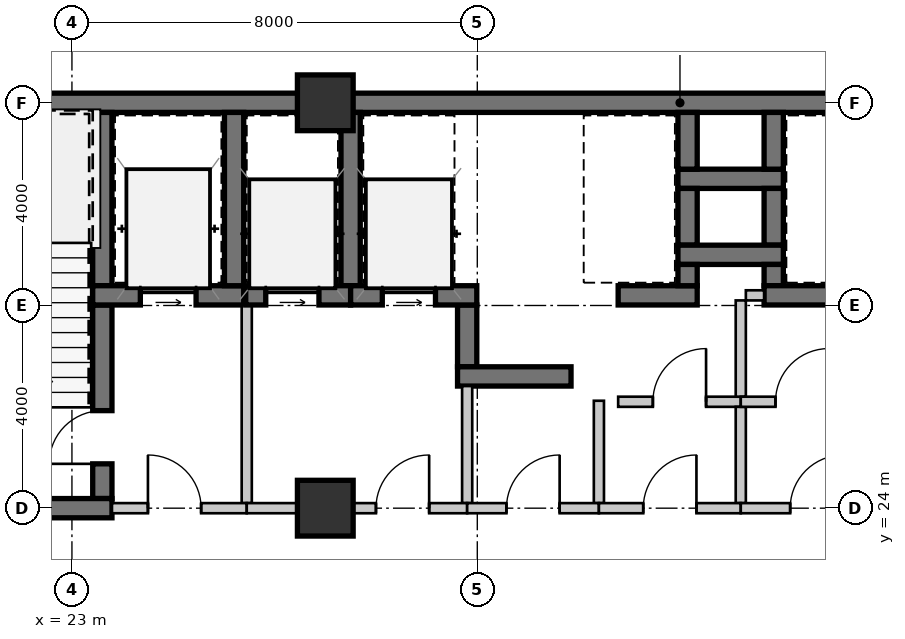
"""IFC4 building model, lengths in metres.
Left out: names, types, materials, properties, quantities, classifications, styles, units other than length and angle.
Written with IfcOpenShell. Run it as: python <this file> out.ifc"""

import sys

from ifc_helpers import new_model, si_unit, direction, frame, frame_2d, origin, origin_2d, place, context, subcontext, project, spatial, rectangle, extrude, source, transform, mapped, element, fill, save


model = new_model("IFC4")
c1 = context("Model", 3, precision=1e-05, world=origin(), true_north=direction((0.0, 1.0)))
c2 = subcontext(c1, "Body", "Model", "MODEL_VIEW")
j1 = project(units=[si_unit("LENGTHUNIT", "METRE"), si_unit("PLANEANGLEUNIT", "RADIAN")], contexts=[c1])
p1 = place(None, origin())
s1 = spatial("IfcSite", under=j1, at=p1, CompositionType="ELEMENT")
p2 = place(p1, origin())
s2 = spatial("IfcBuilding", under=s1, at=p2, CompositionType="ELEMENT")
p3 = place(p2, frame((0.0, 0.0, 12.95)))
s3 = spatial("IfcBuildingStorey", under=s2, at=p3, CompositionType="ELEMENT", Elevation=12.95)
m1 = source(origin(), c2, "Body", "SweptSolid", [
    extrude(rectangle(XDim=1.1, YDim=1.1, at=origin_2d()), origin(), (0.0, 0.0, 1.0), 3.85),
])
for number, where, z_axis, x_axis in (
    (1, (28.0, 24.0, 0.0), (0.0, 0.0, 1.0), (1.0, 0.0, 0.0)),
    (2, (28.0, 32.0, 0.0), (0.0, 0.0, 1.0), (1.0, 0.0, 0.0)),
):
    element("IfcColumn", number, at=place(p3, frame(where, z_axis=z_axis, x_axis=x_axis)), inside=s3, PredefinedType="COLUMN", context=c2, shape_type="MappedRepresentation", body=[
        mapped(m1, transform((0.0, 0.0, 0.0), scale=1.0)),
    ])
m2 = source(origin(), c2, "Body", "SweptSolid", [
    extrude(rectangle(XDim=9.19, YDim=0.38, at=frame_2d((4.595, 0.0))), origin(), (0.0, 0.0, 1.0), 3.43),
])
p4 = place(p3, frame((18.81, 32.0, 0.0), z_axis=(0.0, 0.0, 1.0), x_axis=(1.0, 0.0, 0.0)))
e3 = element("IfcWall", 3, at=p4, inside=s3, PredefinedType="SHEAR", context=c2, shape_type="MappedRepresentation", body=[
    mapped(m2, transform((0.0, 0.0, 0.0), scale=1.0)),
])
m3 = source(origin(), c2, "Body", "SweptSolid", [
    extrude(rectangle(XDim=11.2, YDim=0.38, at=frame_2d((5.6, 0.0))), origin(), (0.0, 0.0, 1.0), 3.43),
])
p5 = place(p3, frame((28.0, 32.0, 0.0), z_axis=(0.0, 0.0, 1.0), x_axis=(1.0, 0.0, 0.0)))
e4 = element("IfcWall", 4, at=p5, inside=s3, PredefinedType="SHEAR", context=c2, shape_type="MappedRepresentation", body=[
    mapped(m3, transform((0.0, 0.0, 0.0), scale=1.0)),
])
m4 = source(origin(), c2, "Body", "SweptSolid", [
    extrude(rectangle(XDim=3.42, YDim=0.38, at=frame_2d((1.71, 0.0))), origin(), (0.0, 0.0, 1.0), 3.43),
])
p6 = place(p3, frame((23.6, 28.39, 0.0), z_axis=(0.0, 0.0, 1.0), x_axis=(0.0, 1.0, 0.0)))
e5 = element("IfcWall", 5, at=p6, inside=s3, PredefinedType="SHEAR", context=c2, shape_type="MappedRepresentation", body=[
    mapped(m4, transform((0.0, 0.0, 0.0), scale=1.0)),
])
m5 = source(origin(), c2, "Body", "SweptSolid", [
    extrude(rectangle(XDim=3.82, YDim=0.38, at=frame_2d((1.91, 0.0))), origin(), (0.0, 0.0, 1.0), 3.43),
])
p7 = place(p3, frame((23.6, 24.19, 0.0), z_axis=(0.0, 0.0, 1.0), x_axis=(0.0, 1.0, 0.0)))
e6 = element("IfcWall", 6, at=p7, inside=s3, PredefinedType="SHEAR", context=c2, shape_type="MappedRepresentation", body=[
    mapped(m5, transform((0.0, 0.0, 0.0), scale=1.0)),
])
m6 = source(origin(), c2, "Body", "SweptSolid", [
    extrude(rectangle(XDim=1.05, YDim=2.1, at=frame_2d((0.525, 1.05))), frame((0.0, 0.2, 0.0), z_axis=(0.0, -1.0, 0.0), x_axis=(1.0, 0.0, 0.0)), (0.0, 0.0, 1.0), 0.4),
])
p8 = place(p7, frame((0.685, 0.0, 0.0)))
e7 = element("IfcOpeningElement", 7, at=p8, cuts=e6, PredefinedType="OPENING", context=c2, shape_type="MappedRepresentation", body=[
    mapped(m6, transform((0.0, 0.0, 0.0), scale=1.0)),
])
m7 = source(origin(), c2, "Body", "SweptSolid", [
    extrude(rectangle(XDim=4.98, YDim=0.38, at=frame_2d((2.49, 0.0))), origin(), (0.0, 0.0, 1.0), 3.43),
])
p9 = place(p3, frame((18.81, 24.0, 0.0), z_axis=(0.0, 0.0, 1.0), x_axis=(1.0, 0.0, 0.0)))
e8 = element("IfcWall", 8, at=p9, inside=s3, PredefinedType="SHEAR", context=c2, shape_type="MappedRepresentation", body=[
    mapped(m7, transform((0.0, 0.0, 0.0), scale=1.0)),
])
m8 = source(origin(), c2, "Body", "SweptSolid", [
    extrude(rectangle(XDim=2.98, YDim=0.38, at=frame_2d((1.49, 0.0))), origin(), (0.0, 0.0, 1.0), 3.43),
])
p10 = place(p3, frame((23.41, 28.2, 0.0), z_axis=(0.0, 0.0, 1.0), x_axis=(1.0, 0.0, 0.0)))
e9 = element("IfcWall", 9, at=p10, inside=s3, PredefinedType="SHEAR", context=c2, shape_type="MappedRepresentation", body=[
    mapped(m8, transform((0.0, 0.0, 0.0), scale=1.0)),
])
m9 = source(origin(), c2, "Body", "SweptSolid", [
    extrude(rectangle(XDim=1.1, YDim=2.15, at=frame_2d((0.55, 1.075))), frame((0.0, 0.2, 0.0), z_axis=(0.0, -1.0, 0.0), x_axis=(1.0, 0.0, 0.0)), (0.0, 0.0, 1.0), 0.4),
])
p11 = place(p10, frame((0.94, 0.0, 0.0)))
e10 = element("IfcOpeningElement", 10, at=p11, cuts=e9, PredefinedType="OPENING", context=c2, shape_type="MappedRepresentation", body=[
    mapped(m9, transform((0.0, 0.0, 0.0), scale=1.0)),
])
p12 = place(p3, frame((26.2, 28.39, 0.0), z_axis=(0.0, 0.0, 1.0), x_axis=(0.0, 1.0, 0.0)))
e11 = element("IfcWall", 11, at=p12, inside=s3, PredefinedType="SHEAR", context=c2, shape_type="MappedRepresentation", body=[
    mapped(m4, transform((0.0, 0.0, 0.0), scale=1.0)),
])
m10 = source(origin(), c2, "Body", "SweptSolid", [
    extrude(rectangle(XDim=3.91, YDim=0.2, at=frame_2d((1.955, 0.0))), origin(), (0.0, 0.0, 1.0), 3.43),
])
p13 = place(p3, frame((26.45, 24.1, 0.0), z_axis=(0.0, 0.0, 1.0), x_axis=(0.0, 1.0, 0.0)))
e12 = element("IfcWall", 12, at=p13, inside=s3, PredefinedType="SOLIDWALL", context=c2, shape_type="MappedRepresentation", body=[
    mapped(m10, transform((0.0, 0.0, 0.0), scale=1.0)),
])
m11 = source(origin(), c2, "Body", "SweptSolid", [
    extrude(rectangle(XDim=2.66, YDim=0.2, at=frame_2d((1.33, 0.0))), origin(), (0.0, 0.0, 1.0), 2.97),
])
p14 = place(p3, frame((23.79, 24.0, 0.0), z_axis=(0.0, 0.0, 1.0), x_axis=(1.0, 0.0, 0.0)))
e13 = element("IfcWall", 13, at=p14, inside=s3, PredefinedType="SOLIDWALL", context=c2, shape_type="MappedRepresentation", body=[
    mapped(m11, transform((0.0, 0.0, 0.0), scale=1.0)),
])
m12 = source(origin(), c2, "Body", "SweptSolid", [
    extrude(rectangle(XDim=1.05, YDim=2.1, at=frame_2d((0.525, 1.05))), frame((0.0, 0.11, 0.0), z_axis=(0.0, -1.0, 0.0), x_axis=(1.0, 0.0, 0.0)), (0.0, 0.0, 1.0), 0.22),
])
p15 = place(p14, frame((0.71, 0.0, 0.0)))
e14 = element("IfcOpeningElement", 14, at=p15, cuts=e13, PredefinedType="OPENING", context=c2, shape_type="MappedRepresentation", body=[
    mapped(m12, transform((0.0, 0.0, 0.0), scale=1.0)),
])
m13 = source(origin(), c2, "Body", "SweptSolid", [
    extrude(rectangle(XDim=2.08, YDim=0.38, at=frame_2d((1.04, 0.0))), origin(), (0.0, 0.0, 1.0), 3.43),
])
p16 = place(p3, frame((34.96, 30.5, 0.0), z_axis=(0.0, 0.0, 1.0), x_axis=(1.0, 0.0, 0.0)))
e15 = element("IfcWall", 15, at=p16, inside=s3, PredefinedType="SHEAR", context=c2, shape_type="MappedRepresentation", body=[
    mapped(m13, transform((0.0, 0.0, 0.0), scale=1.0)),
])
m14 = source(origin(), c2, "Body", "SweptSolid", [
    extrude(rectangle(XDim=1.12, YDim=0.38, at=frame_2d((0.56, 0.0))), origin(), (0.0, 0.0, 1.0), 3.43),
])
for number, where, z_axis, x_axis in (
    (16, (35.15, 31.81, 0.0), (0.0, 0.0, 1.0), (0.0, -1.0, 0.0)),
    (17, (36.85, 30.69, 0.0), (0.0, 0.0, 1.0), (0.0, 1.0, 0.0)),
    (18, (35.15, 30.31, 0.0), (0.0, 0.0, 1.0), (0.0, -1.0, 0.0)),
    (19, (36.85, 29.19, 0.0), (0.0, 0.0, 1.0), (0.0, 1.0, 0.0)),
):
    element("IfcWall", number, at=place(p3, frame(where, z_axis=z_axis, x_axis=x_axis)), inside=s3, PredefinedType="SHEAR", context=c2, shape_type="MappedRepresentation", body=[
        mapped(m14, transform((0.0, 0.0, 0.0), scale=1.0)),
    ])
p17 = place(p3, frame((34.96, 29.0, 0.0), z_axis=(0.0, 0.0, 1.0), x_axis=(1.0, 0.0, 0.0)))
e20 = element("IfcWall", 20, at=p17, inside=s3, PredefinedType="SHEAR", context=c2, shape_type="MappedRepresentation", body=[
    mapped(m13, transform((0.0, 0.0, 0.0), scale=1.0)),
])
m15 = source(origin(), c2, "Body", "SweptSolid", [
    extrude(rectangle(XDim=1.22, YDim=0.38, at=frame_2d((0.61, 0.0))), origin(), (0.0, 0.0, 1.0), 3.43),
])
p18 = place(p3, frame((30.8, 28.01, 0.0), z_axis=(0.0, 0.0, 1.0), x_axis=(0.0, -1.0, 0.0)))
e21 = element("IfcWall", 21, at=p18, inside=s3, PredefinedType="SHEAR", context=c2, shape_type="MappedRepresentation", body=[
    mapped(m15, transform((0.0, 0.0, 0.0), scale=1.0)),
])
m16 = source(origin(), c2, "Body", "SweptSolid", [
    extrude(rectangle(XDim=2.24, YDim=0.38, at=frame_2d((1.12, 0.0))), origin(), (0.0, 0.0, 1.0), 3.43),
])
p19 = place(p3, frame((30.61, 26.6, 0.0), z_axis=(0.0, 0.0, 1.0), x_axis=(1.0, 0.0, 0.0)))
e22 = element("IfcWall", 22, at=p19, inside=s3, PredefinedType="SHEAR", context=c2, shape_type="MappedRepresentation", body=[
    mapped(m16, transform((0.0, 0.0, 0.0), scale=1.0)),
])
p20 = place(p3, frame((28.5, 28.39, 0.0), z_axis=(0.0, 0.0, 1.0), x_axis=(0.0, 1.0, 0.0)))
e23 = element("IfcWall", 23, at=p20, inside=s3, PredefinedType="SHEAR", context=c2, shape_type="MappedRepresentation", body=[
    mapped(m4, transform((0.0, 0.0, 0.0), scale=1.0)),
])
m17 = source(origin(), c2, "Body", "SweptSolid", [
    extrude(rectangle(XDim=2.07, YDim=0.38, at=frame_2d((1.035, 0.0))), origin(), (0.0, 0.0, 1.0), 3.43),
])
p21 = place(p3, frame((26.43, 28.2, 0.0), z_axis=(0.0, 0.0, 1.0), x_axis=(1.0, 0.0, 0.0)))
e24 = element("IfcWall", 24, at=p21, inside=s3, PredefinedType="SHEAR", context=c2, shape_type="MappedRepresentation", body=[
    mapped(m17, transform((0.0, 0.0, 0.0), scale=1.0)),
])
m18 = source(origin(), c2, "Body", "SweptSolid", [
    extrude(rectangle(XDim=1.05, YDim=2.15, at=frame_2d((0.525, 1.075))), frame((0.0, 0.2, 0.0), z_axis=(0.0, -1.0, 0.0), x_axis=(1.0, 0.0, 0.0)), (0.0, 0.0, 1.0), 0.4),
])
p22 = place(p21, frame((0.395, 0.0, 0.0)))
e25 = element("IfcOpeningElement", 25, at=p22, cuts=e24, PredefinedType="OPENING", context=c2, shape_type="MappedRepresentation", body=[
    mapped(m18, transform((0.0, 0.0, 0.0), scale=1.0)),
])
m19 = source(origin(), c2, "Body", "SweptSolid", [
    extrude(rectangle(XDim=2.49, YDim=0.38, at=frame_2d((1.245, 0.0))), origin(), (0.0, 0.0, 1.0), 3.43),
])
p23 = place(p3, frame((28.5, 28.2, 0.0), z_axis=(0.0, 0.0, 1.0), x_axis=(1.0, 0.0, 0.0)))
e26 = element("IfcWall", 26, at=p23, inside=s3, PredefinedType="SHEAR", context=c2, shape_type="MappedRepresentation", body=[
    mapped(m19, transform((0.0, 0.0, 0.0), scale=1.0)),
])
p24 = place(p23, frame((0.625, 0.0, 0.0)))
e27 = element("IfcOpeningElement", 27, at=p24, cuts=e26, PredefinedType="OPENING", context=c2, shape_type="MappedRepresentation", body=[
    mapped(m18, transform((0.0, 0.0, 0.0), scale=1.0)),
])
m20 = source(origin(), c2, "Body", "SweptSolid", [
    extrude(rectangle(XDim=2.31, YDim=0.2, at=frame_2d((1.155, 0.0))), origin(), (0.0, 0.0, 1.0), 3.43),
])
p25 = place(p3, frame((30.8, 26.41, 0.0), z_axis=(0.0, 0.0, 1.0), x_axis=(0.0, -1.0, 0.0)))
e28 = element("IfcWall", 28, at=p25, inside=s3, PredefinedType="SOLIDWALL", context=c2, shape_type="MappedRepresentation", body=[
    mapped(m20, transform((0.0, 0.0, 0.0), scale=1.0)),
])
m21 = source(origin(), c2, "Body", "SweptSolid", [
    extrude(rectangle(XDim=4.35, YDim=0.2, at=frame_2d((2.175, 0.0))), origin(), (0.0, 0.0, 1.0), 2.97),
])
p26 = place(p3, frame((30.8, 24.0, 0.0), z_axis=(0.0, 0.0, 1.0), x_axis=(-1.0, 0.0, 0.0)))
e29 = element("IfcWall", 29, at=p26, inside=s3, PredefinedType="SOLIDWALL", context=c2, shape_type="MappedRepresentation", body=[
    mapped(m21, transform((0.0, 0.0, 0.0), scale=1.0)),
])
p27 = place(p26, frame((0.75, 0.0, 0.0)))
e30 = element("IfcOpeningElement", 30, at=p27, cuts=e29, PredefinedType="OPENING", context=c2, shape_type="MappedRepresentation", body=[
    mapped(m12, transform((0.0, 0.0, 0.0), scale=1.0)),
])
m22 = source(origin(), c2, "Body", "SweptSolid", [
    extrude(rectangle(XDim=1.56, YDim=0.38, at=frame_2d((0.78, 0.0))), origin(), (0.0, 0.0, 1.0), 3.43),
])
p28 = place(p3, frame((33.78, 28.2, 0.0), z_axis=(0.0, 0.0, 1.0), x_axis=(1.0, 0.0, 0.0)))
e31 = element("IfcWall", 31, at=p28, inside=s3, PredefinedType="SHEAR", context=c2, shape_type="MappedRepresentation", body=[
    mapped(m22, transform((0.0, 0.0, 0.0), scale=1.0)),
])
m23 = source(origin(), c2, "Body", "SweptSolid", [
    extrude(rectangle(XDim=0.42, YDim=0.38, at=frame_2d((0.21, 0.0))), origin(), (0.0, 0.0, 1.0), 3.43),
])
for number, where, z_axis, x_axis in (
    (32, (35.15, 28.39, 0.0), (0.0, 0.0, 1.0), (0.0, 1.0, 0.0)),
    (33, (36.85, 28.81, 0.0), (0.0, 0.0, 1.0), (0.0, -1.0, 0.0)),
):
    element("IfcWall", number, at=place(p3, frame(where, z_axis=z_axis, x_axis=x_axis)), inside=s3, PredefinedType="SHEAR", context=c2, shape_type="MappedRepresentation", body=[
        mapped(m23, transform((0.0, 0.0, 0.0), scale=1.0)),
    ])
m24 = source(origin(), c2, "Body", "SweptSolid", [
    extrude(rectangle(XDim=1.96, YDim=0.38, at=frame_2d((0.98, 0.0))), origin(), (0.0, 0.0, 1.0), 3.43),
])
p29 = place(p3, frame((36.66, 28.2, 0.0), z_axis=(0.0, 0.0, 1.0), x_axis=(1.0, 0.0, 0.0)))
e34 = element("IfcWall", 34, at=p29, inside=s3, PredefinedType="SHEAR", context=c2, shape_type="MappedRepresentation", body=[
    mapped(m24, transform((0.0, 0.0, 0.0), scale=1.0)),
])
m25 = source(origin(), c2, "Body", "SweptSolid", [
    extrude(rectangle(XDim=2.02, YDim=0.2, at=frame_2d((1.01, 0.0))), origin(), (0.0, 0.0, 1.0), 3.43),
])
p30 = place(p3, frame((33.4, 26.12, 0.0), z_axis=(0.0, 0.0, 1.0), x_axis=(0.0, -1.0, 0.0)))
e35 = element("IfcWall", 35, at=p30, inside=s3, PredefinedType="SOLIDWALL", context=c2, shape_type="MappedRepresentation", body=[
    mapped(m25, transform((0.0, 0.0, 0.0), scale=1.0)),
])
m26 = source(origin(), c2, "Body", "SweptSolid", [
    extrude(rectangle(XDim=2.6, YDim=0.2, at=frame_2d((1.3, 0.0))), origin(), (0.0, 0.0, 1.0), 2.97),
])
p31 = place(p3, frame((33.4, 24.0, 0.0), z_axis=(0.0, 0.0, 1.0), x_axis=(-1.0, 0.0, 0.0)))
e36 = element("IfcWall", 36, at=p31, inside=s3, PredefinedType="SOLIDWALL", context=c2, shape_type="MappedRepresentation", body=[
    mapped(m26, transform((0.0, 0.0, 0.0), scale=1.0)),
])
p32 = place(p31, frame((0.775, 0.0, 0.0)))
e37 = element("IfcOpeningElement", 37, at=p32, cuts=e36, PredefinedType="OPENING", context=c2, shape_type="MappedRepresentation", body=[
    mapped(m12, transform((0.0, 0.0, 0.0), scale=1.0)),
])
m27 = source(origin(), c2, "Body", "SweptSolid", [
    extrude(rectangle(XDim=2.42, YDim=0.2, at=frame_2d((1.21, 0.0))), origin(), (0.0, 0.0, 1.0), 3.43),
])
p33 = place(p3, frame((33.78, 26.1, 0.0), z_axis=(0.0, 0.0, 1.0), x_axis=(1.0, 0.0, 0.0)))
e38 = element("IfcWall", 38, at=p33, inside=s3, PredefinedType="SOLIDWALL", context=c2, shape_type="MappedRepresentation", body=[
    mapped(m27, transform((0.0, 0.0, 0.0), scale=1.0)),
])
p34 = place(p33, frame((0.685, 0.0, 0.0)))
e39 = element("IfcOpeningElement", 39, at=p34, cuts=e38, PredefinedType="OPENING", context=c2, shape_type="MappedRepresentation", body=[
    mapped(m12, transform((0.0, 0.0, 0.0), scale=1.0)),
])
m28 = source(origin(), c2, "Body", "SweptSolid", [
    extrude(rectangle(XDim=1.9, YDim=0.2, at=frame_2d((0.95, 0.0))), origin(), (0.0, 0.0, 1.0), 3.43),
])
p35 = place(p3, frame((36.2, 26.0, 0.0), z_axis=(0.0, 0.0, 1.0), x_axis=(0.0, -1.0, 0.0)))
e40 = element("IfcWall", 40, at=p35, inside=s3, PredefinedType="SOLIDWALL", context=c2, shape_type="MappedRepresentation", body=[
    mapped(m28, transform((0.0, 0.0, 0.0), scale=1.0)),
])
m29 = source(origin(), c2, "Body", "SweptSolid", [
    extrude(rectangle(XDim=2.8, YDim=0.2, at=frame_2d((1.4, 0.0))), origin(), (0.0, 0.0, 1.0), 2.97),
])
p36 = place(p3, frame((36.2, 24.0, 0.0), z_axis=(0.0, 0.0, 1.0), x_axis=(-1.0, 0.0, 0.0)))
e41 = element("IfcWall", 41, at=p36, inside=s3, PredefinedType="SOLIDWALL", context=c2, shape_type="MappedRepresentation", body=[
    mapped(m29, transform((0.0, 0.0, 0.0), scale=1.0)),
])
p37 = place(p36, frame((0.875, 0.0, 0.0)))
e42 = element("IfcOpeningElement", 42, at=p37, cuts=e41, PredefinedType="OPENING", context=c2, shape_type="MappedRepresentation", body=[
    mapped(m12, transform((0.0, 0.0, 0.0), scale=1.0)),
])
m30 = source(origin(), c2, "Body", "SweptSolid", [
    extrude(rectangle(XDim=1.9, YDim=0.2, at=frame_2d((0.95, 0.0))), origin(), (0.0, 0.0, 1.0), 3.43),
])
p38 = place(p3, frame((36.2, 28.1, 0.0), z_axis=(0.0, 0.0, 1.0), x_axis=(0.0, -1.0, 0.0)))
e43 = element("IfcWall", 43, at=p38, inside=s3, PredefinedType="SOLIDWALL", context=c2, shape_type="MappedRepresentation", body=[
    mapped(m30, transform((0.0, 0.0, 0.0), scale=1.0)),
])
m31 = source(origin(), c2, "Body", "SweptSolid", [
    extrude(rectangle(XDim=0.36, YDim=0.2, at=frame_2d((0.18, 0.0))), origin(), (0.0, 0.0, 1.0), 3.43),
])
p39 = place(p3, frame((36.66, 28.2, 0.0), z_axis=(0.0, 0.0, 1.0), x_axis=(-1.0, 0.0, 0.0)))
e44 = element("IfcWall", 44, at=p39, inside=s3, PredefinedType="SOLIDWALL", context=c2, shape_type="MappedRepresentation", body=[
    mapped(m31, transform((0.0, 0.0, 0.0), scale=1.0)),
])
m32 = source(origin(), c2, "Body", "SweptSolid", [
    extrude(rectangle(XDim=2.42, YDim=0.2, at=frame_2d((1.21, 0.0))), origin(), (0.0, 0.0, 1.0), 3.43),
])
p40 = place(p3, frame((36.2, 26.1, 0.0), z_axis=(0.0, 0.0, 1.0), x_axis=(1.0, 0.0, 0.0)))
e45 = element("IfcWall", 45, at=p40, inside=s3, PredefinedType="SOLIDWALL", context=c2, shape_type="MappedRepresentation", body=[
    mapped(m32, transform((0.0, 0.0, 0.0), scale=1.0)),
])
p41 = place(p40, frame((0.685, 0.0, 0.0)))
e46 = element("IfcOpeningElement", 46, at=p41, cuts=e45, PredefinedType="OPENING", context=c2, shape_type="MappedRepresentation", body=[
    mapped(m12, transform((0.0, 0.0, 0.0), scale=1.0)),
])
m33 = source(origin(), c2, "Body", "SweptSolid", [
    extrude(rectangle(XDim=3.0, YDim=0.2, at=frame_2d((1.5, 0.0))), origin(), (0.0, 0.0, 1.0), 2.97),
])
p42 = place(p3, frame((39.2, 24.0, 0.0), z_axis=(0.0, 0.0, 1.0), x_axis=(-1.0, 0.0, 0.0)))
e47 = element("IfcWall", 47, at=p42, inside=s3, PredefinedType="SOLIDWALL", context=c2, shape_type="MappedRepresentation", body=[
    mapped(m33, transform((0.0, 0.0, 0.0), scale=1.0)),
])
p43 = place(p42, frame((0.975, 0.0, 0.0)))
e48 = element("IfcOpeningElement", 48, at=p43, cuts=e47, PredefinedType="OPENING", context=c2, shape_type="MappedRepresentation", body=[
    mapped(m12, transform((0.0, 0.0, 0.0), scale=1.0)),
])
m34 = source(origin(), c2, "Body", "SweptSolid", [
    extrude(rectangle(XDim=1.05, YDim=2.1, at=frame_2d((0.525, 1.05))), frame((0.0, 0.025, 0.0), z_axis=(0.0, -1.0, 0.0), x_axis=(1.0, 0.0, 0.0)), (0.0, 0.0, 1.0), 0.05),
])
p44 = place(p8, origin())
e49 = element("IfcDoor", 49, at=p44, inside=s3, OperationType="SINGLE_SWING_LEFT", PredefinedType="DOOR", context=c2, shape_type="MappedRepresentation", body=[
    mapped(m34, transform((0.0, 0.0, 0.0), scale=1.0)),
])
fill(e7, e49)
m35 = source(origin(), c2, "Body", "SweptSolid", [
    extrude(rectangle(XDim=1.1, YDim=2.15, at=frame_2d((0.55, 1.075))), frame((0.0, 0.025, 0.0), z_axis=(0.0, -1.0, 0.0), x_axis=(1.0, 0.0, 0.0)), (0.0, 0.0, 1.0), 0.05),
])
p45 = place(p11, origin())
e50 = element("IfcDoor", 50, at=p45, inside=s3, OperationType="SLIDING_TO_LEFT", PredefinedType="DOOR", context=c2, shape_type="MappedRepresentation", body=[
    mapped(m35, transform((0.0, 0.0, 0.0), scale=1.0)),
])
fill(e10, e50)
p46 = place(p15, origin())
e51 = element("IfcDoor", 51, at=p46, inside=s3, OperationType="SINGLE_SWING_LEFT", PredefinedType="DOOR", context=c2, shape_type="MappedRepresentation", body=[
    mapped(m34, transform((0.0, 0.0, 0.0), scale=1.0)),
])
fill(e14, e51)
m36 = source(origin(), c2, "Body", "SweptSolid", [
    extrude(rectangle(XDim=1.05, YDim=2.15, at=frame_2d((0.525, 1.075))), frame((0.0, 0.025, 0.0), z_axis=(0.0, -1.0, 0.0), x_axis=(1.0, 0.0, 0.0)), (0.0, 0.0, 1.0), 0.05),
])
p47 = place(p22, origin())
e52 = element("IfcDoor", 52, at=p47, inside=s3, OperationType="SLIDING_TO_LEFT", PredefinedType="DOOR", context=c2, shape_type="MappedRepresentation", body=[
    mapped(m36, transform((0.0, 0.0, 0.0), scale=1.0)),
])
fill(e25, e52)
p48 = place(p24, origin())
e53 = element("IfcDoor", 53, at=p48, inside=s3, OperationType="SLIDING_TO_LEFT", PredefinedType="DOOR", context=c2, shape_type="MappedRepresentation", body=[
    mapped(m36, transform((0.0, 0.0, 0.0), scale=1.0)),
])
fill(e27, e53)
p49 = place(p27, frame((1.05, 0.0, 0.0), z_axis=(0.0, 0.0, 1.0), x_axis=(-1.0, 0.0, 0.0)))
e54 = element("IfcDoor", 54, at=p49, inside=s3, OperationType="SINGLE_SWING_RIGHT", PredefinedType="DOOR", context=c2, shape_type="MappedRepresentation", body=[
    mapped(m34, transform((0.0, 0.0, 0.0), scale=1.0)),
])
fill(e30, e54)
p50 = place(p32, frame((1.05, 0.0, 0.0), z_axis=(0.0, 0.0, 1.0), x_axis=(-1.0, 0.0, 0.0)))
e55 = element("IfcDoor", 55, at=p50, inside=s3, OperationType="SINGLE_SWING_RIGHT", PredefinedType="DOOR", context=c2, shape_type="MappedRepresentation", body=[
    mapped(m34, transform((0.0, 0.0, 0.0), scale=1.0)),
])
fill(e37, e55)
p51 = place(p34, origin())
e56 = element("IfcDoor", 56, at=p51, inside=s3, OperationType="SINGLE_SWING_RIGHT", PredefinedType="DOOR", context=c2, shape_type="MappedRepresentation", body=[
    mapped(m34, transform((0.0, 0.0, 0.0), scale=1.0)),
])
fill(e39, e56)
p52 = place(p37, frame((1.05, 0.0, 0.0), z_axis=(0.0, 0.0, 1.0), x_axis=(-1.0, 0.0, 0.0)))
e57 = element("IfcDoor", 57, at=p52, inside=s3, OperationType="SINGLE_SWING_RIGHT", PredefinedType="DOOR", context=c2, shape_type="MappedRepresentation", body=[
    mapped(m34, transform((0.0, 0.0, 0.0), scale=1.0)),
])
fill(e42, e57)
p53 = place(p41, origin())
e58 = element("IfcDoor", 58, at=p53, inside=s3, OperationType="SINGLE_SWING_RIGHT", PredefinedType="DOOR", context=c2, shape_type="MappedRepresentation", body=[
    mapped(m34, transform((0.0, 0.0, 0.0), scale=1.0)),
])
fill(e46, e58)
p54 = place(p43, frame((1.05, 0.0, 0.0), z_axis=(0.0, 0.0, 1.0), x_axis=(-1.0, 0.0, 0.0)))
e59 = element("IfcDoor", 59, at=p54, inside=s3, OperationType="SINGLE_SWING_RIGHT", PredefinedType="DOOR", context=c2, shape_type="MappedRepresentation", body=[
    mapped(m34, transform((0.0, 0.0, 0.0), scale=1.0)),
])
fill(e48, e59)
save(model, sys.argv[1])
